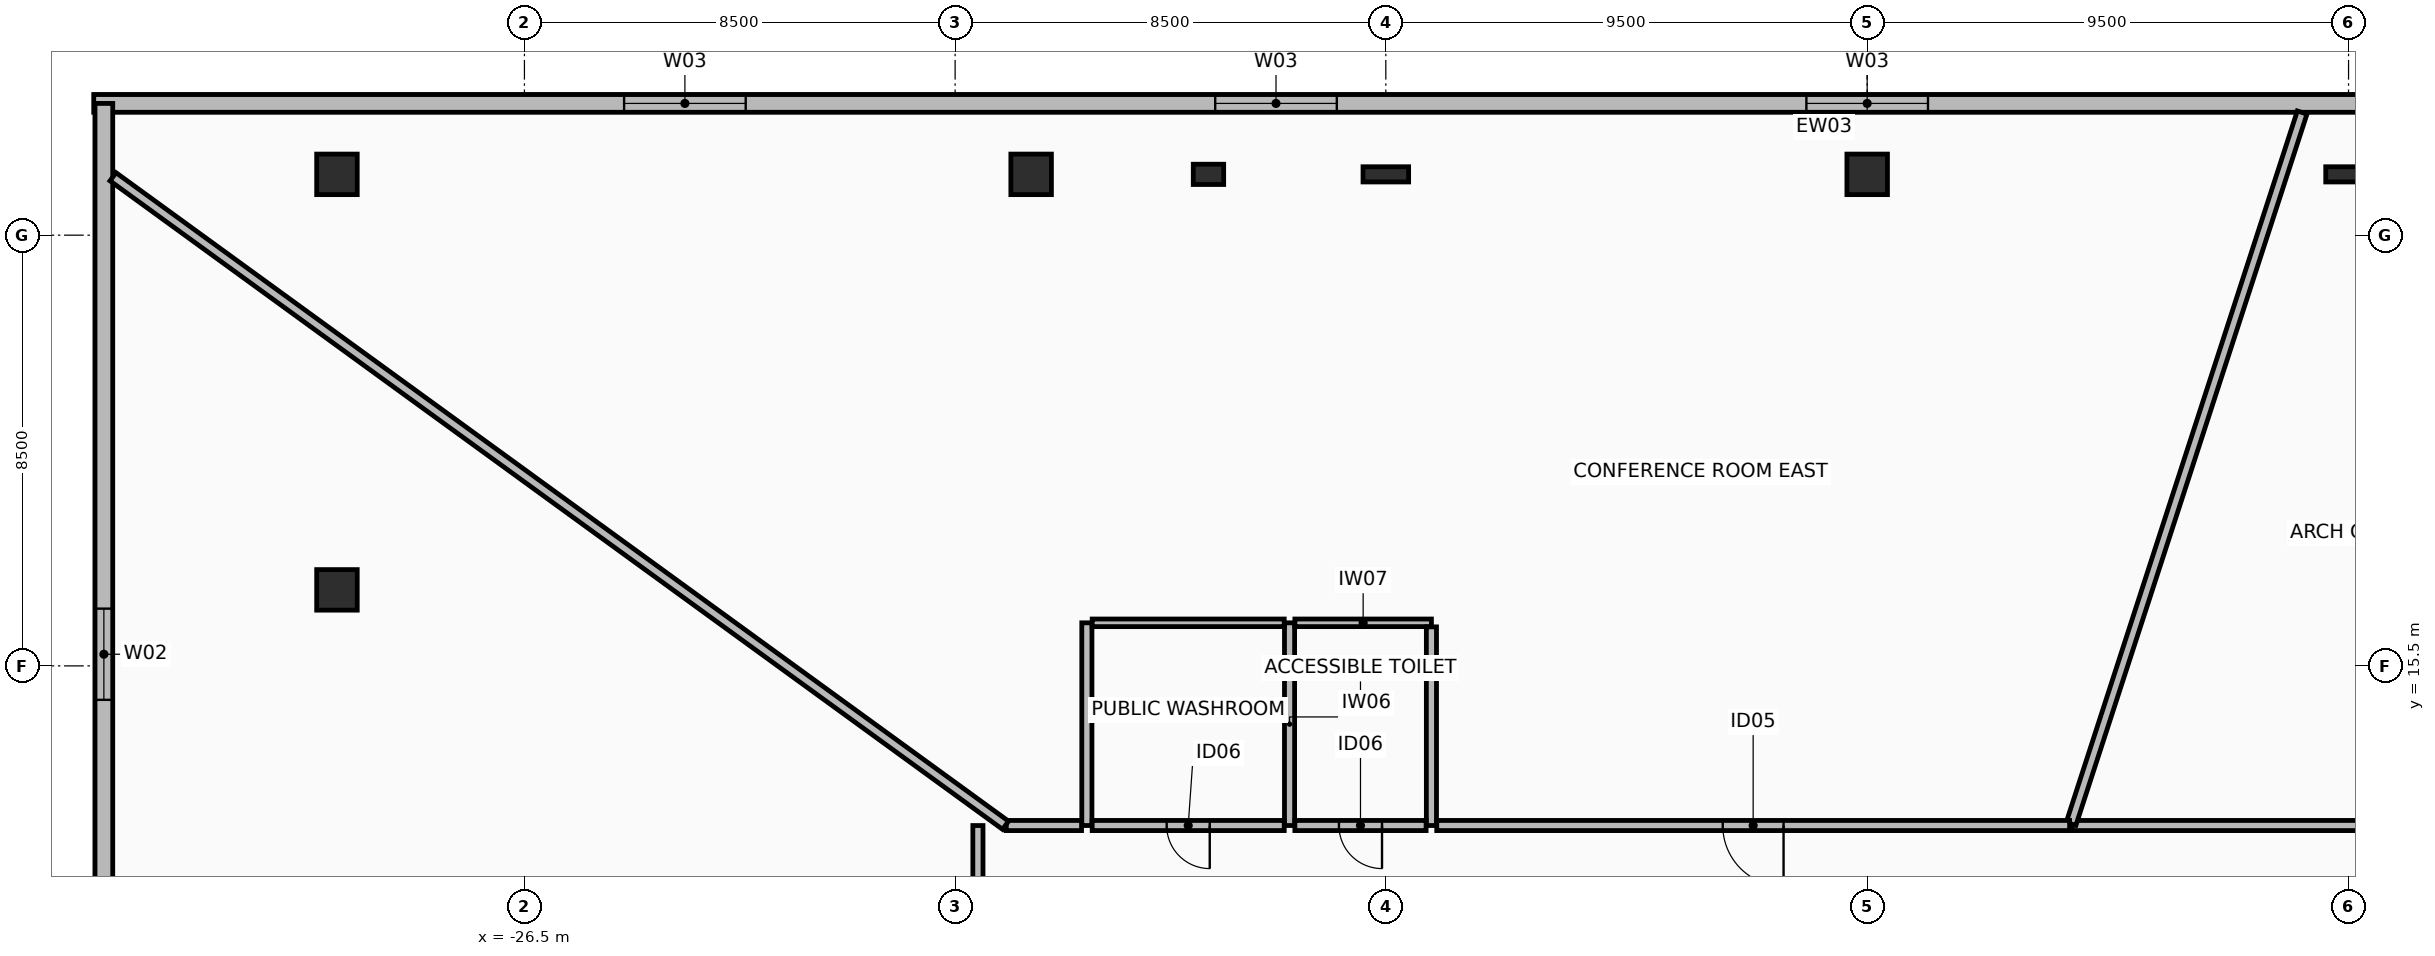
"""IFC4 building model, lengths in metres.
Left out: names, types, materials, properties, quantities, classifications, styles, units other than length and angle.
Written with IfcOpenShell. Run it as: python <this file> out.ifc"""

import sys

from ifc_helpers import new_model, si_unit, direction, frame, frame_2d, origin, origin_2d, place, context, subcontext, project, spatial, rectangle, hollow_rectangle, i_section, extrude, element, fill, save


model = new_model("IFC4")
c1 = context("Model", 3, precision=1e-05, world=origin(), true_north=direction((0.0, 1.0)))
c2 = subcontext(c1, "Body", "Model", "MODEL_VIEW")
j1 = project(units=[si_unit("LENGTHUNIT", "METRE"), si_unit("PLANEANGLEUNIT", "RADIAN")], contexts=[c1])
p1 = place(None, origin())
s1 = spatial("IfcSite", under=j1, at=p1, CompositionType="ELEMENT")
p2 = place(p1, origin())
s2 = spatial("IfcBuilding", under=s1, at=p2, CompositionType="ELEMENT")
p3 = place(p2, frame((0.0, 0.0, 11.0)))
s3 = spatial("IfcBuildingStorey", under=s2, at=p3, CompositionType="ELEMENT", Elevation=11.0)
p4 = place(p3, frame((-13.0, 25.2, 0.0), z_axis=(0.0, 0.0, 1.0), x_axis=(1.0, 0.0, 0.0)))
e1 = element("IfcColumn", 1, at=p4, inside=s3, PredefinedType="PILASTER", context=c2, shape_type="SweptSolid", body=[
    extrude(rectangle(XDim=0.6, YDim=0.4, at=origin_2d()), origin(), (0.0, 0.0, 1.0), 5.5),
])
for number, where, z_axis, x_axis in (
    (2, (-30.2, 25.2, 0.0), (0.0, 0.0, 1.0), (1.0, 0.0, 0.0)),
    (3, (-16.5, 25.2, 0.0), (0.0, 0.0, 1.0), (1.0, 0.0, 0.0)),
):
    element("IfcColumn", number, at=place(p3, frame(where, z_axis=z_axis, x_axis=x_axis)), inside=s3, PredefinedType="COLUMN", context=c2, shape_type="SweptSolid", body=[
        extrude(hollow_rectangle(XDim=0.8, YDim=0.8, WallThickness=0.045, at=origin_2d()), origin(), (0.0, 0.0, 1.0), 5.5),
    ])
p5 = place(p3, frame((-9.5, 25.2, 0.0), z_axis=(0.0, 0.0, 1.0), x_axis=(1.0, 0.0, 0.0)))
e4 = element("IfcColumn", 4, at=p5, inside=s3, PredefinedType="COLUMN", context=c2, shape_type="SweptSolid", body=[
    extrude(i_section(OverallWidth=0.3, OverallDepth=0.9, WebThickness=0.019, FlangeThickness=0.035, at=origin_2d()), origin(), (0.0, 0.0, 1.0), 5.5),
])
p6 = place(p3, frame((0.0, 25.2, 0.0), z_axis=(0.0, 0.0, 1.0), x_axis=(1.0, 0.0, 0.0)))
e5 = element("IfcColumn", 5, at=p6, inside=s3, PredefinedType="COLUMN", context=c2, shape_type="SweptSolid", body=[
    extrude(hollow_rectangle(XDim=0.8, YDim=0.8, WallThickness=0.045, at=origin_2d()), origin(), (0.0, 0.0, 1.0), 5.5),
])
p7 = place(p3, frame((9.5, 25.2, 0.0), z_axis=(0.0, 0.0, 1.0), x_axis=(1.0, 0.0, 0.0)))
e6 = element("IfcColumn", 6, at=p7, inside=s3, PredefinedType="COLUMN", context=c2, shape_type="SweptSolid", body=[
    extrude(i_section(OverallWidth=0.3, OverallDepth=0.9, WebThickness=0.019, FlangeThickness=0.035, at=origin_2d()), origin(), (0.0, 0.0, 1.0), 5.5),
])
p8 = place(p3, frame((-30.2, 17.0, 0.0), z_axis=(0.0, 0.0, 1.0), x_axis=(1.0, 0.0, 0.0)))
e7 = element("IfcColumn", 7, at=p8, inside=s3, PredefinedType="COLUMN", context=c2, shape_type="SweptSolid", body=[
    extrude(hollow_rectangle(XDim=0.8, YDim=0.8, WallThickness=0.045, at=origin_2d()), origin(), (0.0, 0.0, 1.0), 5.5),
])
p9 = place(p3, frame((35.0, 26.6, 0.0), z_axis=(0.0, 0.0, 1.0), x_axis=(-1.0, 0.0, 0.0)))
e8 = element("IfcWall", 8, at=p9, inside=s3, PredefinedType="STANDARD", context=c2, shape_type="SweptSolid", body=[
    extrude(rectangle(XDim=70.0, YDim=0.35, at=frame_2d((35.0, 0.0))), origin(), (0.0, 0.0, 1.0), 5.24),
])
p10 = place(p9, frame((10.467, 0.0, 0.9)))
e9 = element("IfcOpeningElement", 9, at=p10, cuts=e8, PredefinedType="OPENING", context=c2, shape_type="SweptSolid", body=[
    extrude(rectangle(XDim=2.4, YDim=2.4, at=frame_2d((1.2, 1.2))), frame((0.0, 0.185, 0.0), z_axis=(0.0, -1.0, 0.0), x_axis=(1.0, 0.0, 0.0)), (0.0, 0.0, 1.0), 0.37),
])
p11 = place(p9, frame((22.133, 0.0, 0.9)))
e10 = element("IfcOpeningElement", 10, at=p11, cuts=e8, PredefinedType="OPENING", context=c2, shape_type="SweptSolid", body=[
    extrude(rectangle(XDim=2.4, YDim=2.4, at=frame_2d((1.2, 1.2))), frame((0.0, 0.185, 0.0), z_axis=(0.0, -1.0, 0.0), x_axis=(1.0, 0.0, 0.0)), (0.0, 0.0, 1.0), 0.37),
])
p12 = place(p9, frame((33.8, 0.0, 0.9)))
e11 = element("IfcOpeningElement", 11, at=p12, cuts=e8, PredefinedType="OPENING", context=c2, shape_type="SweptSolid", body=[
    extrude(rectangle(XDim=2.4, YDim=2.4, at=frame_2d((1.2, 1.2))), frame((0.0, 0.185, 0.0), z_axis=(0.0, -1.0, 0.0), x_axis=(1.0, 0.0, 0.0)), (0.0, 0.0, 1.0), 0.37),
])
p13 = place(p9, frame((45.467, 0.0, 0.9)))
e12 = element("IfcOpeningElement", 12, at=p13, cuts=e8, PredefinedType="OPENING", context=c2, shape_type="SweptSolid", body=[
    extrude(rectangle(XDim=2.4, YDim=2.4, at=frame_2d((1.2, 1.2))), frame((0.0, 0.185, 0.0), z_axis=(0.0, -1.0, 0.0), x_axis=(1.0, 0.0, 0.0)), (0.0, 0.0, 1.0), 0.37),
])
p14 = place(p9, frame((57.133, 0.0, 0.9)))
e13 = element("IfcOpeningElement", 13, at=p14, cuts=e8, PredefinedType="OPENING", context=c2, shape_type="SweptSolid", body=[
    extrude(rectangle(XDim=2.4, YDim=2.4, at=frame_2d((1.2, 1.2))), frame((0.0, 0.185, 0.0), z_axis=(0.0, -1.0, 0.0), x_axis=(1.0, 0.0, 0.0)), (0.0, 0.0, 1.0), 0.37),
])
p15 = place(p3, frame((-34.8, 26.6, 0.0), z_axis=(0.0, 0.0, 1.0), x_axis=(0.0, -1.0, 0.0)))
e14 = element("IfcWall", 14, at=p15, inside=s3, PredefinedType="STANDARD", context=c2, shape_type="SweptSolid", body=[
    extrude(rectangle(XDim=54.35, YDim=0.35, at=frame_2d((27.175, 0.0))), origin(), (0.0, 0.0, 1.0), 5.24),
])
p16 = place(p15, frame((9.97, 0.0, 0.95)))
e15 = element("IfcOpeningElement", 15, at=p16, cuts=e14, PredefinedType="OPENING", context=c2, shape_type="SweptSolid", body=[
    extrude(rectangle(XDim=1.8, YDim=2.2, at=frame_2d((0.9, 1.1))), frame((0.0, 0.185, 0.0), z_axis=(0.0, -1.0, 0.0), x_axis=(1.0, 0.0, 0.0)), (0.0, 0.0, 1.0), 0.37),
])
p17 = place(p15, frame((20.84, 0.0, 0.95)))
e16 = element("IfcOpeningElement", 16, at=p17, cuts=e14, PredefinedType="OPENING", context=c2, shape_type="SweptSolid", body=[
    extrude(rectangle(XDim=1.8, YDim=2.2, at=frame_2d((0.9, 1.1))), frame((0.0, 0.185, 0.0), z_axis=(0.0, -1.0, 0.0), x_axis=(1.0, 0.0, 0.0)), (0.0, 0.0, 1.0), 0.37),
])
p18 = place(p15, frame((31.71, 0.0, 0.95)))
e17 = element("IfcOpeningElement", 17, at=p18, cuts=e14, PredefinedType="OPENING", context=c2, shape_type="SweptSolid", body=[
    extrude(rectangle(XDim=1.8, YDim=2.2, at=frame_2d((0.9, 1.1))), frame((0.0, 0.185, 0.0), z_axis=(0.0, -1.0, 0.0), x_axis=(1.0, 0.0, 0.0)), (0.0, 0.0, 1.0), 0.37),
])
p19 = place(p15, frame((42.58, 0.0, 0.95)))
e18 = element("IfcOpeningElement", 18, at=p19, cuts=e14, PredefinedType="OPENING", context=c2, shape_type="SweptSolid", body=[
    extrude(rectangle(XDim=1.8, YDim=2.2, at=frame_2d((0.9, 1.1))), frame((0.0, 0.185, 0.0), z_axis=(0.0, -1.0, 0.0), x_axis=(1.0, 0.0, 0.0)), (0.0, 0.0, 1.0), 0.37),
])
p20 = place(p3, frame((-11.4, 12.35, 0.0), z_axis=(0.0, 0.0, 1.0), x_axis=(0.0, 1.0, 0.0)))
e19 = element("IfcWall", 19, at=p20, inside=s3, PredefinedType="PARTITIONING", context=c2, shape_type="SweptSolid", body=[
    extrude(rectangle(XDim=4.0, YDim=0.2, at=frame_2d((2.0, 0.0))), origin(), (0.0, 0.0, 1.0), 4.785),
])
p21 = place(p3, frame((-11.295, 16.35, 0.0), z_axis=(0.0, 0.0, 1.0), x_axis=(1.0, 0.0, 0.0)))
e20 = element("IfcWall", 20, at=p21, inside=s3, PredefinedType="PARTITIONING", context=c2, shape_type="SweptSolid", body=[
    extrude(rectangle(XDim=2.695, YDim=0.15, at=frame_2d((1.347, 0.0))), origin(), (0.0, 0.0, 1.0), 3.435),
])
p22 = place(p3, frame((-8.6, 16.27, 0.0), z_axis=(0.0, 0.0, 1.0), x_axis=(0.0, -1.0, 0.0)))
e21 = element("IfcWall", 21, at=p22, inside=s3, PredefinedType="PARTITIONING", context=c2, shape_type="SweptSolid", body=[
    extrude(rectangle(XDim=3.92, YDim=0.2, at=frame_2d((1.96, 0.0))), origin(), (0.0, 0.0, 1.0), 3.435),
])
p23 = place(p3, frame((-8.705, 12.35, 0.0), z_axis=(0.0, 0.0, 1.0), x_axis=(-1.0, 0.0, 0.0)))
e22 = element("IfcWall", 22, at=p23, inside=s3, PredefinedType="PARTITIONING", context=c2, shape_type="SweptSolid", body=[
    extrude(rectangle(XDim=2.59, YDim=0.2, at=frame_2d((1.295, 0.0))), origin(), (0.0, 0.0, 1.0), 3.435),
])
p24 = place(p23, frame((0.87, 0.0, 0.0)))
e23 = element("IfcOpeningElement", 23, at=p24, cuts=e22, PredefinedType="OPENING", context=c2, shape_type="SweptSolid", body=[
    extrude(rectangle(XDim=0.85, YDim=2.1, at=frame_2d((0.425, 1.05))), frame((0.0, 0.11, 0.0), z_axis=(0.0, -1.0, 0.0), x_axis=(1.0, 0.0, 0.0)), (0.0, 0.0, 1.0), 0.22),
])
p25 = place(p3, frame((-15.4, 12.35, 0.0), z_axis=(0.0, 0.0, 1.0), x_axis=(0.0, 1.0, 0.0)))
e24 = element("IfcWall", 24, at=p25, inside=s3, PredefinedType="PARTITIONING", context=c2, shape_type="SweptSolid", body=[
    extrude(rectangle(XDim=4.0, YDim=0.2, at=frame_2d((2.0, 0.0))), origin(), (0.0, 0.0, 1.0), 4.785),
])
p26 = place(p3, frame((-15.295, 16.35, 0.0), z_axis=(0.0, 0.0, 1.0), x_axis=(1.0, 0.0, 0.0)))
e25 = element("IfcWall", 25, at=p26, inside=s3, PredefinedType="PARTITIONING", context=c2, shape_type="SweptSolid", body=[
    extrude(rectangle(XDim=3.79, YDim=0.15, at=frame_2d((1.895, 0.0))), origin(), (0.0, 0.0, 1.0), 5.24),
])
p27 = place(p3, frame((-11.505, 12.35, 0.0), z_axis=(0.0, 0.0, 1.0), x_axis=(-1.0, 0.0, 0.0)))
e26 = element("IfcWall", 26, at=p27, inside=s3, PredefinedType="PARTITIONING", context=c2, shape_type="SweptSolid", body=[
    extrude(rectangle(XDim=3.79, YDim=0.2, at=frame_2d((1.895, 0.0))), origin(), (0.0, 0.0, 1.0), 5.24),
])
p28 = place(p27, frame((1.47, 0.0, 0.0)))
e27 = element("IfcOpeningElement", 27, at=p28, cuts=e26, PredefinedType="OPENING", context=c2, shape_type="SweptSolid", body=[
    extrude(rectangle(XDim=0.85, YDim=2.1, at=frame_2d((0.425, 1.05))), frame((0.0, 0.11, 0.0), z_axis=(0.0, -1.0, 0.0), x_axis=(1.0, 0.0, 0.0)), (0.0, 0.0, 1.0), 0.22),
])
p29 = place(p3, frame((17.525, 12.35, 0.0), z_axis=(0.0, 0.0, 1.0), x_axis=(-1.0, 0.0, 0.0)))
e28 = element("IfcWall", 28, at=p29, inside=s3, PredefinedType="PARTITIONING", context=c2, shape_type="SweptSolid", body=[
    extrude(rectangle(XDim=13.478, YDim=0.2, at=frame_2d((6.739, 0.0))), origin(), (0.0, 0.0, 1.0), 3.435),
])
p30 = place(p3, frame((4.023, 12.383, 0.0), z_axis=(0.0, 0.0, 1.0), x_axis=(0.309008273832, 0.951059349727, 0.0)))
e29 = element("IfcWall", 29, at=p30, inside=s3, PredefinedType="PARTITIONING", context=c2, shape_type="SweptSolid", body=[
    extrude(rectangle(XDim=14.76, YDim=0.2, at=frame_2d((7.38, 0.0))), origin(), (0.0, 0.0, 1.0), 4.335),
])
p31 = place(p3, frame((3.995, 12.35, 0.0), z_axis=(0.0, 0.0, 1.0), x_axis=(-1.0, 0.0, 0.0)))
e30 = element("IfcWall", 30, at=p31, inside=s3, PredefinedType="PARTITIONING", context=c2, shape_type="SweptSolid", body=[
    extrude(rectangle(XDim=12.49, YDim=0.2, at=frame_2d((6.245, 0.0))), origin(), (0.0, 0.0, 1.0), 3.435),
])
p32 = place(p31, frame((5.645, 0.0, 0.0)))
e31 = element("IfcOpeningElement", 31, at=p32, cuts=e30, PredefinedType="OPENING", context=c2, shape_type="SweptSolid", body=[
    extrude(rectangle(XDim=1.2, YDim=2.15, at=frame_2d((0.6, 1.075))), frame((0.0, 0.11, 0.0), z_axis=(0.0, -1.0, 0.0), x_axis=(1.0, 0.0, 0.0)), (0.0, 0.0, 1.0), 0.22),
])
p33 = place(p3, frame((-15.505, 12.35, 0.0), z_axis=(0.0, 0.0, 1.0), x_axis=(-1.0, 0.0, 0.0)))
e32 = element("IfcWall", 32, at=p33, inside=s3, PredefinedType="PARTITIONING", context=c2, shape_type="SweptSolid", body=[
    extrude(rectangle(XDim=1.485, YDim=0.2, at=frame_2d((0.743, 0.0))), origin(), (0.0, 0.0, 1.0), 3.435),
])
p34 = place(p3, frame((-17.005, 12.355, 0.0), z_axis=(0.0, 0.0, 1.0), x_axis=(-0.809019641583, 0.587781608707, 0.0)))
e33 = element("IfcWall", 33, at=p34, inside=s3, PredefinedType="PARTITIONING", context=c2, shape_type="SweptSolid", body=[
    extrude(rectangle(XDim=21.773, YDim=0.2, at=frame_2d((10.887, 0.0))), origin(), (0.0, 0.0, 1.0), 4.435),
])
p35 = place(p3, frame((-17.55, 12.349, 0.0), z_axis=(0.0, 0.0, 1.0), x_axis=(0.0, -1.0, 0.0)))
e34 = element("IfcWall", 34, at=p35, inside=s3, PredefinedType="PARTITIONING", context=c2, shape_type="SweptSolid", body=[
    extrude(rectangle(XDim=24.524, YDim=0.2, at=frame_2d((12.262, 0.0))), origin(), (0.0, 0.0, 1.0), 3.435),
])
p36 = place(p35, frame((13.462, 0.0, 0.0)))
e35 = element("IfcOpeningElement", 35, at=p36, cuts=e34, PredefinedType="OPENING", context=c2, shape_type="SweptSolid", body=[
    extrude(rectangle(XDim=1.2, YDim=2.15, at=frame_2d((0.6, 1.075))), frame((0.0, 0.11, 0.0), z_axis=(0.0, -1.0, 0.0), x_axis=(1.0, 0.0, 0.0)), (0.0, 0.0, 1.0), 0.22),
])
p37 = place(p12, origin())
e36 = element("IfcWindow", 36, at=p37, inside=s3, PartitioningType="SINGLE_PANEL", PredefinedType="WINDOW", context=c2, shape_type="SweptSolid", body=[
    extrude(rectangle(XDim=2.4, YDim=2.4, at=frame_2d((1.2, 1.2))), frame((0.0, 0.03, 0.0), z_axis=(0.0, -1.0, 0.0), x_axis=(1.0, 0.0, 0.0)), (0.0, 0.0, 1.0), 0.06),
])
fill(e11, e36)
p38 = place(p13, origin())
e37 = element("IfcWindow", 37, at=p38, inside=s3, PartitioningType="SINGLE_PANEL", PredefinedType="WINDOW", context=c2, shape_type="SweptSolid", body=[
    extrude(rectangle(XDim=2.4, YDim=2.4, at=frame_2d((1.2, 1.2))), frame((0.0, 0.03, 0.0), z_axis=(0.0, -1.0, 0.0), x_axis=(1.0, 0.0, 0.0)), (0.0, 0.0, 1.0), 0.06),
])
fill(e12, e37)
p39 = place(p14, origin())
e38 = element("IfcWindow", 38, at=p39, inside=s3, PartitioningType="SINGLE_PANEL", PredefinedType="WINDOW", context=c2, shape_type="SweptSolid", body=[
    extrude(rectangle(XDim=2.4, YDim=2.4, at=frame_2d((1.2, 1.2))), frame((0.0, 0.03, 0.0), z_axis=(0.0, -1.0, 0.0), x_axis=(1.0, 0.0, 0.0)), (0.0, 0.0, 1.0), 0.06),
])
fill(e13, e38)
p40 = place(p16, origin())
e39 = element("IfcWindow", 39, at=p40, inside=s3, PartitioningType="SINGLE_PANEL", PredefinedType="WINDOW", context=c2, shape_type="SweptSolid", body=[
    extrude(rectangle(XDim=1.8, YDim=2.2, at=frame_2d((0.9, 1.1))), frame((0.0, 0.03, 0.0), z_axis=(0.0, -1.0, 0.0), x_axis=(1.0, 0.0, 0.0)), (0.0, 0.0, 1.0), 0.06),
])
fill(e15, e39)
p41 = place(p24, origin())
e40 = element("IfcDoor", 40, at=p41, inside=s3, OperationType="SINGLE_SWING_RIGHT", PredefinedType="DOOR", context=c2, shape_type="SweptSolid", body=[
    extrude(rectangle(XDim=0.85, YDim=2.1, at=frame_2d((0.425, 1.05))), frame((0.0, 0.025, 0.0), z_axis=(0.0, -1.0, 0.0), x_axis=(1.0, 0.0, 0.0)), (0.0, 0.0, 1.0), 0.05),
])
fill(e23, e40)
p42 = place(p28, origin())
e41 = element("IfcDoor", 41, at=p42, inside=s3, OperationType="SINGLE_SWING_RIGHT", PredefinedType="DOOR", context=c2, shape_type="SweptSolid", body=[
    extrude(rectangle(XDim=0.85, YDim=2.1, at=frame_2d((0.425, 1.05))), frame((0.0, 0.025, 0.0), z_axis=(0.0, -1.0, 0.0), x_axis=(1.0, 0.0, 0.0)), (0.0, 0.0, 1.0), 0.05),
])
fill(e27, e41)
p43 = place(p32, origin())
e42 = element("IfcDoor", 42, at=p43, inside=s3, OperationType="SINGLE_SWING_LEFT", PredefinedType="DOOR", context=c2, shape_type="SweptSolid", body=[
    extrude(rectangle(XDim=1.2, YDim=2.15, at=frame_2d((0.6, 1.075))), frame((0.0, 0.025, 0.0), z_axis=(0.0, -1.0, 0.0), x_axis=(1.0, 0.0, 0.0)), (0.0, 0.0, 1.0), 0.05),
])
fill(e31, e42)
save(model, sys.argv[1])
